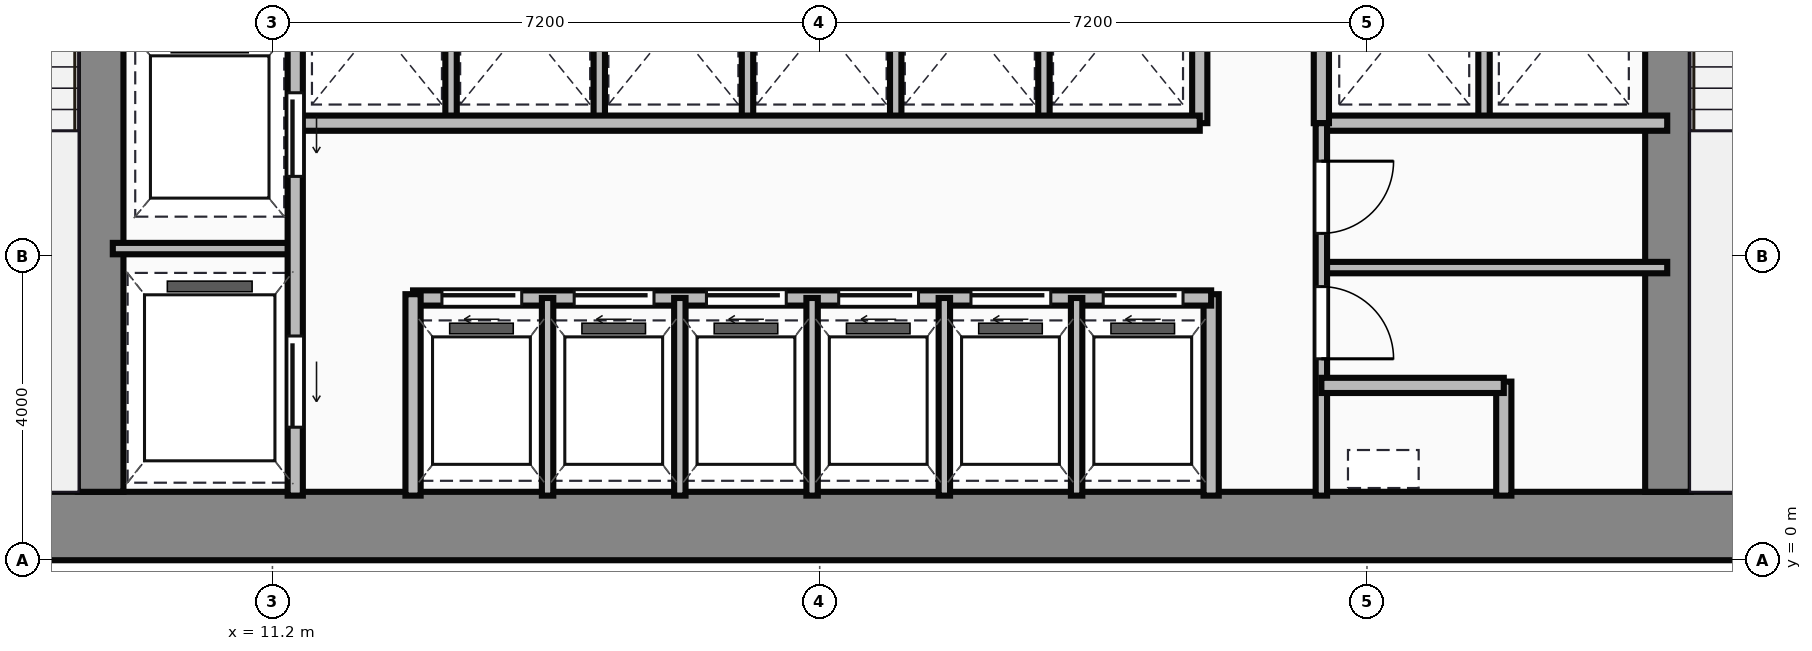
"""IFC4 building model, lengths in metres.
Left out: names, types, materials, properties, quantities, classifications, styles, units other than length and angle.
Written with IfcOpenShell. Run it as: python <this file> out.ifc"""

import sys

from ifc_helpers import new_model, si_unit, direction, frame, frame_2d, origin, place, context, subcontext, project, spatial, rectangle, extrude, source, transform, mapped, element, fill, save


model = new_model("IFC4")
c1 = context("Model", 3, precision=1e-05, world=origin(), true_north=direction((0.0, 1.0)))
c2 = subcontext(c1, "Body", "Model", "MODEL_VIEW")
j1 = project(units=[si_unit("LENGTHUNIT", "METRE"), si_unit("PLANEANGLEUNIT", "RADIAN")], contexts=[c1])
p1 = place(None, origin())
s1 = spatial("IfcSite", under=j1, at=p1, CompositionType="ELEMENT")
p2 = place(p1, origin())
s2 = spatial("IfcBuilding", under=s1, at=p2, CompositionType="ELEMENT")
p3 = place(p2, frame((0.0, 0.0, 61.7)))
s3 = spatial("IfcBuildingStorey", under=s2, at=p3, CompositionType="ELEMENT", Elevation=61.7)
m1 = source(origin(), c2, "Body", "SweptSolid", [
    extrude(rectangle(XDim=29.5, YDim=0.9, at=frame_2d((14.75, 0.0))), origin(), (0.0, 0.0, 1.0), 3.65),
])
p4 = place(p3, frame((4.5, 0.45, 0.0), z_axis=(0.0, 0.0, 1.0), x_axis=(1.0, 0.0, 0.0)))
e1 = element("IfcWall", 1, at=p4, inside=s3, PredefinedType="SHEAR", context=c2, shape_type="MappedRepresentation", body=[
    mapped(m1, transform((0.0, 0.0, 0.0))),
])
m2 = source(origin(), c2, "Body", "SweptSolid", [
    extrude(rectangle(XDim=12.2, YDim=0.6, at=frame_2d((6.1, 0.0))), origin(), (0.0, 0.0, 1.0), 3.65),
])
for number, where, z_axis, x_axis in (
    (2, (8.94, 0.9, 0.0), (0.0, 0.0, 1.0), (0.0, 1.0, 0.0)),
    (3, (29.56, 0.9, 0.0), (0.0, 0.0, 1.0), (0.0, 1.0, 0.0)),
):
    element("IfcWall", number, at=place(p3, frame(where, z_axis=z_axis, x_axis=x_axis)), inside=s3, PredefinedType="SHEAR", context=c2, shape_type="MappedRepresentation", body=[
        mapped(m2, transform((0.0, 0.0, 0.0))),
    ])
m3 = source(origin(), c2, "Body", "SweptSolid", [
    extrude(rectangle(XDim=9.6, YDim=0.2, at=frame_2d((4.8, 0.0))), origin(), (0.0, 0.0, 1.0), 3.4),
])
p5 = place(p3, frame((11.5, 0.85, 0.0), z_axis=(0.0, 0.0, 1.0), x_axis=(0.0, 1.0, 0.0)))
e4 = element("IfcWall", 4, at=p5, inside=s3, PredefinedType="PARTITIONING", context=c2, shape_type="MappedRepresentation", body=[
    mapped(m3, transform((0.0, 0.0, 0.0))),
])
p6 = place(p5, frame((4.2, 0.0, 0.0)))
e5 = element("IfcOpeningElement", 5, at=p6, cuts=e4, PredefinedType="OPENING", context=c2, shape_type="SweptSolid", body=[
    extrude(rectangle(XDim=1.1, YDim=2.15, at=frame_2d((0.55, 1.075))), frame((0.0, 0.11, 0.0), z_axis=(0.0, -1.0, 0.0), x_axis=(1.0, 0.0, 0.0)), (0.0, 0.0, 1.0), 0.22),
])
p7 = place(p5, frame((0.9, 0.0, 0.0)))
e6 = element("IfcOpeningElement", 6, at=p7, cuts=e4, PredefinedType="OPENING", context=c2, shape_type="SweptSolid", body=[
    extrude(rectangle(XDim=1.2, YDim=2.15, at=frame_2d((0.6, 1.075))), frame((0.0, 0.11, 0.0), z_axis=(0.0, -1.0, 0.0), x_axis=(1.0, 0.0, 0.0)), (0.0, 0.0, 1.0), 0.22),
])
m4 = source(origin(), c2, "Body", "SweptSolid", [
    extrude(rectangle(XDim=2.4, YDim=0.15, at=frame_2d((1.2, 0.0))), origin(), (0.0, 0.0, 1.0), 3.4),
])
p8 = place(p3, frame((9.1, 4.1, 0.0), z_axis=(0.0, 0.0, 1.0), x_axis=(1.0, 0.0, 0.0)))
e7 = element("IfcWall", 7, at=p8, inside=s3, PredefinedType="PARTITIONING", context=c2, shape_type="MappedRepresentation", body=[
    mapped(m4, transform((0.0, 0.0, 0.0))),
])
m5 = source(origin(), c2, "Body", "SweptSolid", [
    extrude(rectangle(XDim=2.65, YDim=0.2, at=frame_2d((1.325, 0.0))), origin(), (0.0, 0.0, 1.0), 3.4),
])
p9 = place(p3, frame((13.05, 0.85, 0.0), z_axis=(0.0, 0.0, 1.0), x_axis=(0.0, 1.0, 0.0)))
e8 = element("IfcWall", 8, at=p9, inside=s3, PredefinedType="PARTITIONING", context=c2, shape_type="MappedRepresentation", body=[
    mapped(m5, transform((0.0, 0.0, 0.0))),
])
m6 = source(origin(), c2, "Body", "SweptSolid", [
    extrude(rectangle(XDim=10.5, YDim=0.2, at=frame_2d((5.25, 0.0))), origin(), (0.0, 0.0, 1.0), 3.4),
])
p10 = place(p3, frame((13.05, 3.45, 0.0), z_axis=(0.0, 0.0, 1.0), x_axis=(1.0, 0.0, 0.0)))
e9 = element("IfcWall", 9, at=p10, inside=s3, PredefinedType="PARTITIONING", context=c2, shape_type="MappedRepresentation", body=[
    mapped(m6, transform((0.0, 0.0, 0.0))),
])
p11 = place(p10, frame((0.38, 0.0, 0.0)))
e10 = element("IfcOpeningElement", 10, at=p11, cuts=e9, PredefinedType="OPENING", context=c2, shape_type="SweptSolid", body=[
    extrude(rectangle(XDim=1.05, YDim=2.15, at=frame_2d((0.525, 1.075))), frame((0.0, 0.11, 0.0), z_axis=(0.0, -1.0, 0.0), x_axis=(1.0, 0.0, 0.0)), (0.0, 0.0, 1.0), 0.22),
])
p12 = place(p10, frame((2.12, 0.0, 0.0)))
e11 = element("IfcOpeningElement", 11, at=p12, cuts=e9, PredefinedType="OPENING", context=c2, shape_type="SweptSolid", body=[
    extrude(rectangle(XDim=1.05, YDim=2.15, at=frame_2d((0.525, 1.075))), frame((0.0, 0.11, 0.0), z_axis=(0.0, -1.0, 0.0), x_axis=(1.0, 0.0, 0.0)), (0.0, 0.0, 1.0), 0.22),
])
p13 = place(p10, frame((3.86, 0.0, 0.0)))
e12 = element("IfcOpeningElement", 12, at=p13, cuts=e9, PredefinedType="OPENING", context=c2, shape_type="SweptSolid", body=[
    extrude(rectangle(XDim=1.05, YDim=2.15, at=frame_2d((0.525, 1.075))), frame((0.0, 0.11, 0.0), z_axis=(0.0, -1.0, 0.0), x_axis=(1.0, 0.0, 0.0)), (0.0, 0.0, 1.0), 0.22),
])
p14 = place(p10, frame((5.6, 0.0, 0.0)))
e13 = element("IfcOpeningElement", 13, at=p14, cuts=e9, PredefinedType="OPENING", context=c2, shape_type="SweptSolid", body=[
    extrude(rectangle(XDim=1.05, YDim=2.15, at=frame_2d((0.525, 1.075))), frame((0.0, 0.11, 0.0), z_axis=(0.0, -1.0, 0.0), x_axis=(1.0, 0.0, 0.0)), (0.0, 0.0, 1.0), 0.22),
])
p15 = place(p10, frame((7.34, 0.0, 0.0)))
e14 = element("IfcOpeningElement", 14, at=p15, cuts=e9, PredefinedType="OPENING", context=c2, shape_type="SweptSolid", body=[
    extrude(rectangle(XDim=1.05, YDim=2.15, at=frame_2d((0.525, 1.075))), frame((0.0, 0.11, 0.0), z_axis=(0.0, -1.0, 0.0), x_axis=(1.0, 0.0, 0.0)), (0.0, 0.0, 1.0), 0.22),
])
p16 = place(p10, frame((9.08, 0.0, 0.0)))
e15 = element("IfcOpeningElement", 15, at=p16, cuts=e9, PredefinedType="OPENING", context=c2, shape_type="SweptSolid", body=[
    extrude(rectangle(XDim=1.05, YDim=2.15, at=frame_2d((0.525, 1.075))), frame((0.0, 0.11, 0.0), z_axis=(0.0, -1.0, 0.0), x_axis=(1.0, 0.0, 0.0)), (0.0, 0.0, 1.0), 0.22),
])
p17 = place(p3, frame((23.55, 0.85, 0.0), z_axis=(0.0, 0.0, 1.0), x_axis=(0.0, 1.0, 0.0)))
e16 = element("IfcWall", 16, at=p17, inside=s3, PredefinedType="PARTITIONING", context=c2, shape_type="MappedRepresentation", body=[
    mapped(m5, transform((0.0, 0.0, 0.0))),
])
m7 = source(origin(), c2, "Body", "SweptSolid", [
    extrude(rectangle(XDim=2.6, YDim=0.15, at=frame_2d((1.3, 0.0))), origin(), (0.0, 0.0, 1.0), 3.4),
])
for number, where, z_axis, x_axis in (
    (17, (14.82, 0.85, 0.0), (0.0, 0.0, 1.0), (0.0, 1.0, 0.0)),
    (18, (16.56, 0.85, 0.0), (0.0, 0.0, 1.0), (0.0, 1.0, 0.0)),
    (19, (18.3, 0.85, 0.0), (0.0, 0.0, 1.0), (0.0, 1.0, 0.0)),
    (20, (20.04, 0.85, 0.0), (0.0, 0.0, 1.0), (0.0, 1.0, 0.0)),
    (21, (21.78, 0.85, 0.0), (0.0, 0.0, 1.0), (0.0, 1.0, 0.0)),
):
    element("IfcWall", number, at=place(p3, frame(where, z_axis=z_axis, x_axis=x_axis)), inside=s3, PredefinedType="PARTITIONING", context=c2, shape_type="MappedRepresentation", body=[
        mapped(m7, transform((0.0, 0.0, 0.0))),
    ])
m8 = source(origin(), c2, "Body", "SweptSolid", [
    extrude(rectangle(XDim=11.85, YDim=0.2, at=frame_2d((5.925, 0.0))), origin(), (0.0, 0.0, 1.0), 3.4),
])
p18 = place(p3, frame((11.55, 5.75, 0.0), z_axis=(0.0, 0.0, 1.0), x_axis=(1.0, 0.0, 0.0)))
e22 = element("IfcWall", 22, at=p18, inside=s3, PredefinedType="PARTITIONING", context=c2, shape_type="MappedRepresentation", body=[
    mapped(m8, transform((0.0, 0.0, 0.0))),
])
m9 = source(origin(), c2, "Body", "SweptSolid", [
    extrude(rectangle(XDim=2.6, YDim=0.2, at=frame_2d((1.3, 0.0))), origin(), (0.0, 0.0, 1.0), 3.4),
])
p19 = place(p3, frame((23.4, 5.75, 0.0), z_axis=(0.0, 0.0, 1.0), x_axis=(0.0, 1.0, 0.0)))
e23 = element("IfcWall", 23, at=p19, inside=s3, PredefinedType="PARTITIONING", context=c2, shape_type="MappedRepresentation", body=[
    mapped(m9, transform((0.0, 0.0, 0.0))),
])
m10 = source(origin(), c2, "Body", "SweptSolid", [
    extrude(rectangle(XDim=2.5, YDim=0.15, at=frame_2d((1.25, 0.0))), origin(), (0.0, 0.0, 1.0), 3.4),
])
for number, where, z_axis, x_axis in (
    (24, (13.55, 5.8, 0.0), (0.0, 0.0, 1.0), (0.0, 1.0, 0.0)),
    (25, (15.5, 5.8, 0.0), (0.0, 0.0, 1.0), (0.0, 1.0, 0.0)),
    (26, (17.45, 5.8, 0.0), (0.0, 0.0, 1.0), (0.0, 1.0, 0.0)),
    (27, (19.4, 5.8, 0.0), (0.0, 0.0, 1.0), (0.0, 1.0, 0.0)),
    (28, (21.35, 5.8, 0.0), (0.0, 0.0, 1.0), (0.0, 1.0, 0.0)),
):
    element("IfcWall", number, at=place(p3, frame(where, z_axis=z_axis, x_axis=x_axis)), inside=s3, PredefinedType="PARTITIONING", context=c2, shape_type="MappedRepresentation", body=[
        mapped(m10, transform((0.0, 0.0, 0.0))),
    ])
m11 = source(origin(), c2, "Body", "SweptSolid", [
    extrude(rectangle(XDim=4.55, YDim=0.2, at=frame_2d((2.275, 0.0))), origin(), (0.0, 0.0, 1.0), 3.4),
])
p20 = place(p3, frame((25.0, 5.75, 0.0), z_axis=(0.0, 0.0, 1.0), x_axis=(1.0, 0.0, 0.0)))
e29 = element("IfcWall", 29, at=p20, inside=s3, PredefinedType="PARTITIONING", context=c2, shape_type="MappedRepresentation", body=[
    mapped(m11, transform((0.0, 0.0, 0.0))),
])
p21 = place(p3, frame((25.0, 5.75, 0.0), z_axis=(0.0, 0.0, 1.0), x_axis=(0.0, 1.0, 0.0)))
e30 = element("IfcWall", 30, at=p21, inside=s3, PredefinedType="PARTITIONING", context=c2, shape_type="MappedRepresentation", body=[
    mapped(m9, transform((0.0, 0.0, 0.0))),
])
p22 = place(p3, frame((27.14, 5.8, 0.0), z_axis=(0.0, 0.0, 1.0), x_axis=(0.0, 1.0, 0.0)))
e31 = element("IfcWall", 31, at=p22, inside=s3, PredefinedType="PARTITIONING", context=c2, shape_type="MappedRepresentation", body=[
    mapped(m10, transform((0.0, 0.0, 0.0))),
])
m12 = source(origin(), c2, "Body", "SweptSolid", [
    extrude(rectangle(XDim=4.9, YDim=0.15, at=frame_2d((2.45, 0.0))), origin(), (0.0, 0.0, 1.0), 3.4),
])
p23 = place(p3, frame((25.0, 0.85, 0.0), z_axis=(0.0, 0.0, 1.0), x_axis=(0.0, 1.0, 0.0)))
e32 = element("IfcWall", 32, at=p23, inside=s3, PredefinedType="PARTITIONING", context=c2, shape_type="MappedRepresentation", body=[
    mapped(m12, transform((0.0, 0.0, 0.0))),
])
p24 = place(p23, frame((1.8, 0.0, 0.0)))
e33 = element("IfcOpeningElement", 33, at=p24, cuts=e32, PredefinedType="OPENING", context=c2, shape_type="SweptSolid", body=[
    extrude(rectangle(XDim=0.95, YDim=2.15, at=frame_2d((0.475, 1.075))), frame((0.0, 0.085, 0.0), z_axis=(0.0, -1.0, 0.0), x_axis=(1.0, 0.0, 0.0)), (0.0, 0.0, 1.0), 0.17),
])
p25 = place(p23, frame((3.45, 0.0, 0.0)))
e34 = element("IfcOpeningElement", 34, at=p25, cuts=e32, PredefinedType="OPENING", context=c2, shape_type="SweptSolid", body=[
    extrude(rectangle(XDim=0.95, YDim=2.15, at=frame_2d((0.475, 1.075))), frame((0.0, 0.085, 0.0), z_axis=(0.0, -1.0, 0.0), x_axis=(1.0, 0.0, 0.0)), (0.0, 0.0, 1.0), 0.17),
])
m13 = source(origin(), c2, "Body", "SweptSolid", [
    extrude(rectangle(XDim=2.4, YDim=0.2, at=frame_2d((1.2, 0.0))), origin(), (0.0, 0.0, 1.0), 3.4),
])
p26 = place(p3, frame((25.0, 2.3, 0.0), z_axis=(0.0, 0.0, 1.0), x_axis=(1.0, 0.0, 0.0)))
e35 = element("IfcWall", 35, at=p26, inside=s3, PredefinedType="PARTITIONING", context=c2, shape_type="MappedRepresentation", body=[
    mapped(m13, transform((0.0, 0.0, 0.0))),
])
m14 = source(origin(), c2, "Body", "SweptSolid", [
    extrude(rectangle(XDim=1.5, YDim=0.2, at=frame_2d((0.75, 0.0))), origin(), (0.0, 0.0, 1.0), 3.4),
])
p27 = place(p3, frame((27.4, 0.85, 0.0), z_axis=(0.0, 0.0, 1.0), x_axis=(0.0, 1.0, 0.0)))
e36 = element("IfcWall", 36, at=p27, inside=s3, PredefinedType="PARTITIONING", context=c2, shape_type="MappedRepresentation", body=[
    mapped(m14, transform((0.0, 0.0, 0.0))),
])
m15 = source(origin(), c2, "Body", "SweptSolid", [
    extrude(rectangle(XDim=4.55, YDim=0.15, at=frame_2d((2.275, 0.0))), origin(), (0.0, 0.0, 1.0), 3.4),
])
p28 = place(p3, frame((25.0, 3.85, 0.0), z_axis=(0.0, 0.0, 1.0), x_axis=(1.0, 0.0, 0.0)))
e37 = element("IfcWall", 37, at=p28, inside=s3, PredefinedType="PARTITIONING", context=c2, shape_type="MappedRepresentation", body=[
    mapped(m15, transform((0.0, 0.0, 0.0))),
])
m16 = source(origin(), c2, "Body", "SweptSolid", [
    extrude(rectangle(XDim=1.1, YDim=2.15, at=frame_2d((0.55, 1.075))), frame((0.0, 0.025, 0.0), z_axis=(0.0, -1.0, 0.0), x_axis=(1.0, 0.0, 0.0)), (0.0, 0.0, 1.0), 0.05),
])
p29 = place(p6, frame((1.1, 0.0, 0.0), z_axis=(0.0, 0.0, 1.0), x_axis=(-1.0, 0.0, 0.0)))
e38 = element("IfcDoor", 38, at=p29, inside=s3, OperationType="SLIDING_TO_LEFT", PredefinedType="DOOR", context=c2, shape_type="MappedRepresentation", body=[
    mapped(m16, transform((0.0, 0.0, 0.0))),
])
fill(e5, e38)
m17 = source(origin(), c2, "Body", "SweptSolid", [
    extrude(rectangle(XDim=1.2, YDim=2.15, at=frame_2d((0.6, 1.075))), frame((0.0, 0.025, 0.0), z_axis=(0.0, -1.0, 0.0), x_axis=(1.0, 0.0, 0.0)), (0.0, 0.0, 1.0), 0.05),
])
p30 = place(p7, frame((1.2, 0.0, 0.0), z_axis=(0.0, 0.0, 1.0), x_axis=(-1.0, 0.0, 0.0)))
e39 = element("IfcDoor", 39, at=p30, inside=s3, OperationType="SLIDING_TO_LEFT", PredefinedType="DOOR", context=c2, shape_type="MappedRepresentation", body=[
    mapped(m17, transform((0.0, 0.0, 0.0))),
])
fill(e6, e39)
m18 = source(origin(), c2, "Body", "SweptSolid", [
    extrude(rectangle(XDim=1.05, YDim=2.15, at=frame_2d((0.525, 1.075))), frame((0.0, 0.025, 0.0), z_axis=(0.0, -1.0, 0.0), x_axis=(1.0, 0.0, 0.0)), (0.0, 0.0, 1.0), 0.05),
])
p31 = place(p11, origin())
e40 = element("IfcDoor", 40, at=p31, inside=s3, OperationType="SLIDING_TO_LEFT", PredefinedType="DOOR", context=c2, shape_type="MappedRepresentation", body=[
    mapped(m18, transform((0.0, 0.0, 0.0))),
])
fill(e10, e40)
p32 = place(p12, origin())
e41 = element("IfcDoor", 41, at=p32, inside=s3, OperationType="SLIDING_TO_LEFT", PredefinedType="DOOR", context=c2, shape_type="MappedRepresentation", body=[
    mapped(m18, transform((0.0, 0.0, 0.0))),
])
fill(e11, e41)
p33 = place(p13, origin())
e42 = element("IfcDoor", 42, at=p33, inside=s3, OperationType="SLIDING_TO_LEFT", PredefinedType="DOOR", context=c2, shape_type="MappedRepresentation", body=[
    mapped(m18, transform((0.0, 0.0, 0.0))),
])
fill(e12, e42)
p34 = place(p14, origin())
e43 = element("IfcDoor", 43, at=p34, inside=s3, OperationType="SLIDING_TO_LEFT", PredefinedType="DOOR", context=c2, shape_type="MappedRepresentation", body=[
    mapped(m18, transform((0.0, 0.0, 0.0))),
])
fill(e13, e43)
p35 = place(p15, origin())
e44 = element("IfcDoor", 44, at=p35, inside=s3, OperationType="SLIDING_TO_LEFT", PredefinedType="DOOR", context=c2, shape_type="MappedRepresentation", body=[
    mapped(m18, transform((0.0, 0.0, 0.0))),
])
fill(e14, e44)
p36 = place(p16, origin())
e45 = element("IfcDoor", 45, at=p36, inside=s3, OperationType="SLIDING_TO_LEFT", PredefinedType="DOOR", context=c2, shape_type="MappedRepresentation", body=[
    mapped(m18, transform((0.0, 0.0, 0.0))),
])
fill(e15, e45)
m19 = source(origin(), c2, "Body", "SweptSolid", [
    extrude(rectangle(XDim=0.95, YDim=2.15, at=frame_2d((0.475, 1.075))), frame((0.0, 0.025, 0.0), z_axis=(0.0, -1.0, 0.0), x_axis=(1.0, 0.0, 0.0)), (0.0, 0.0, 1.0), 0.05),
])
p37 = place(p24, origin())
e46 = element("IfcDoor", 46, at=p37, inside=s3, OperationType="SINGLE_SWING_LEFT", PredefinedType="DOOR", context=c2, shape_type="MappedRepresentation", body=[
    mapped(m19, transform((0.0, 0.0, 0.0))),
])
fill(e33, e46)
p38 = place(p25, origin())
e47 = element("IfcDoor", 47, at=p38, inside=s3, OperationType="SINGLE_SWING_RIGHT", PredefinedType="DOOR", context=c2, shape_type="MappedRepresentation", body=[
    mapped(m19, transform((0.0, 0.0, 0.0))),
])
fill(e34, e47)
save(model, sys.argv[1])
